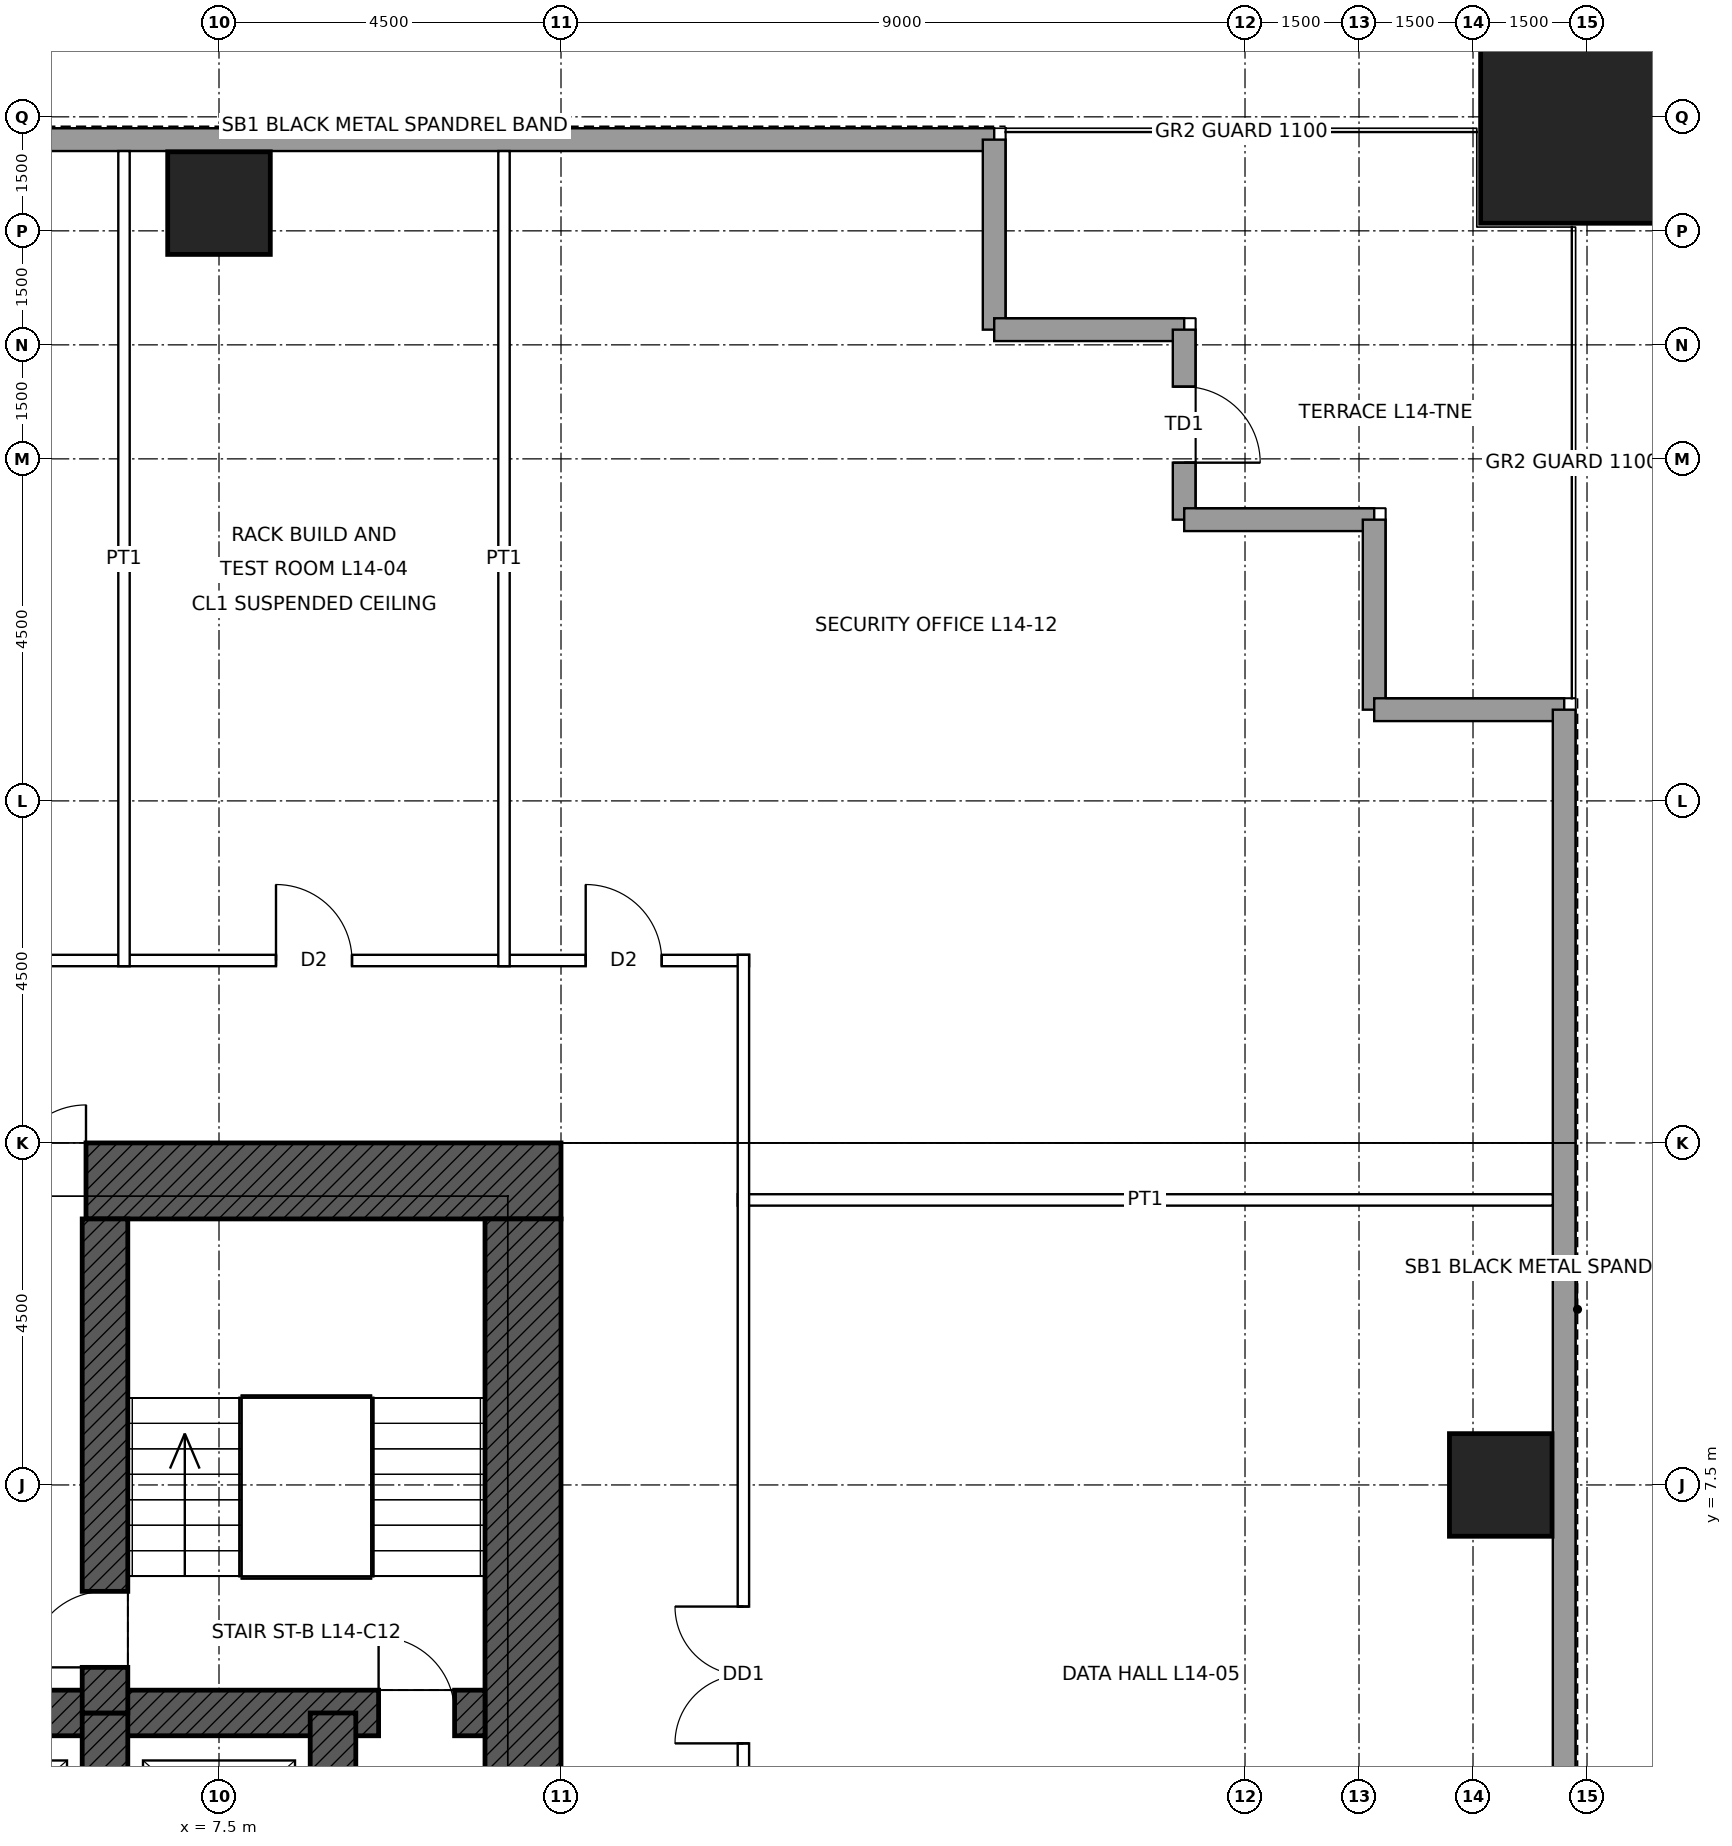
"""IFC4 building model, lengths in metres.
Left out: names, types, materials, properties, quantities, classifications, styles, units other than length and angle.
Written with IfcOpenShell. Run it as: python <this file> out.ifc"""

import sys

from ifc_helpers import new_model, si_unit, direction, frame, frame_2d, origin, origin_2d, place, context, subcontext, project, spatial, rectangle, hollow_rectangle, extrude, element, fill, save


model = new_model("IFC4")
c1 = context("Model", 3, precision=1e-05, world=origin(), true_north=direction((0.0, 1.0)))
c2 = subcontext(c1, "Body", "Model", "MODEL_VIEW")
j1 = project(units=[si_unit("LENGTHUNIT", "METRE"), si_unit("PLANEANGLEUNIT", "RADIAN")], contexts=[c1])
p1 = place(None, origin())
s1 = spatial("IfcSite", under=j1, at=p1, CompositionType="ELEMENT")
p2 = place(p1, origin())
s2 = spatial("IfcBuilding", under=s1, at=p2, CompositionType="ELEMENT")
p3 = place(p2, frame((0.0, 0.0, 73.4)))
s3 = spatial("IfcBuildingStorey", under=s2, at=p3, CompositionType="ELEMENT", Elevation=73.4)
p4 = place(p3, frame((25.5, 25.5, 0.0), z_axis=(0.0, 0.0, 1.0), x_axis=(1.0, 0.0, 0.0)))
e1 = element("IfcColumn", 1, at=p4, inside=s3, PredefinedType="COLUMN", context=c2, shape_type="SweptSolid", body=[
    extrude(hollow_rectangle(XDim=2.8, YDim=2.8, WallThickness=0.14, at=origin_2d()), origin(), (0.0, 0.0, 1.0), 5.0),
])
for number, where, z_axis, x_axis in (
    (2, (7.5, 24.365, 0.0), (0.0, 0.0, 1.0), (1.0, 0.0, 0.0)),
    (3, (24.365, 7.5, 0.0), (0.0, 0.0, 1.0), (1.0, 0.0, 0.0)),
):
    element("IfcColumn", number, at=place(p3, frame(where, z_axis=z_axis, x_axis=x_axis)), inside=s3, PredefinedType="COLUMN", context=c2, shape_type="SweptSolid", body=[
        extrude(hollow_rectangle(XDim=1.35, YDim=1.35, WallThickness=0.085, at=origin_2d()), origin(), (0.0, 0.0, 1.0), 5.0),
    ])
p5 = place(p3, frame((-12.0, 11.5, 0.0), z_axis=(0.0, 0.0, 1.0), x_axis=(1.0, 0.0, 0.0)))
e4 = element("IfcWall", 4, at=p5, inside=s3, PredefinedType="SHEAR", context=c2, shape_type="SweptSolid", body=[
    extrude(rectangle(XDim=24.0, YDim=1.0, at=frame_2d((12.0, 0.0))), origin(), (0.0, 0.0, 1.0), 5.0),
])
p6 = place(p5, frame((6.25, 0.0, 0.0)))
e5 = element("IfcOpeningElement", 5, at=p6, cuts=e4, PredefinedType="OPENING", context=c2, shape_type="SweptSolid", body=[
    extrude(rectangle(XDim=1.0, YDim=2.4, at=frame_2d((0.5, 1.2))), frame((0.0, 0.51, 0.0), z_axis=(0.0, -1.0, 0.0), x_axis=(1.0, 0.0, 0.0)), (0.0, 0.0, 1.0), 1.02),
])
p7 = place(p5, frame((16.75, 0.0, 0.0)))
e6 = element("IfcOpeningElement", 6, at=p7, cuts=e4, PredefinedType="OPENING", context=c2, shape_type="SweptSolid", body=[
    extrude(rectangle(XDim=1.0, YDim=2.4, at=frame_2d((0.5, 1.2))), frame((0.0, 0.51, 0.0), z_axis=(0.0, -1.0, 0.0), x_axis=(1.0, 0.0, 0.0)), (0.0, 0.0, 1.0), 1.02),
])
p8 = place(p3, frame((11.5, 11.0, 0.0), z_axis=(0.0, 0.0, 1.0), x_axis=(0.0, -1.0, 0.0)))
e7 = element("IfcWall", 7, at=p8, inside=s3, PredefinedType="SHEAR", context=c2, shape_type="SweptSolid", body=[
    extrude(rectangle(XDim=22.0, YDim=1.0, at=frame_2d((11.0, 0.0))), origin(), (0.0, 0.0, 1.0), 5.0),
])
p9 = place(p8, frame((10.5, 0.0, 0.0)))
e8 = element("IfcOpeningElement", 8, at=p9, cuts=e7, PredefinedType="OPENING", context=c2, shape_type="SweptSolid", body=[
    extrude(rectangle(XDim=1.0, YDim=2.4, at=frame_2d((0.5, 1.2))), frame((0.0, 0.51, 0.0), z_axis=(0.0, -1.0, 0.0), x_axis=(1.0, 0.0, 0.0)), (0.0, 0.0, 1.0), 1.02),
])
p10 = place(p3, frame((-11.0, 4.5, 0.0), z_axis=(0.0, 0.0, 1.0), x_axis=(1.0, 0.0, 0.0)))
e9 = element("IfcWall", 9, at=p10, inside=s3, PredefinedType="SHEAR", context=c2, shape_type="SweptSolid", body=[
    extrude(rectangle(XDim=22.0, YDim=0.6, at=frame_2d((11.0, 0.0))), origin(), (0.0, 0.0, 1.0), 5.0),
])
p11 = place(p10, frame((0.4, 0.0, 0.0)))
e10 = element("IfcOpeningElement", 10, at=p11, cuts=e9, PredefinedType="OPENING", context=c2, shape_type="SweptSolid", body=[
    extrude(rectangle(XDim=1.0, YDim=2.1, at=frame_2d((0.5, 1.05))), frame((0.0, 0.31, 0.0), z_axis=(0.0, -1.0, 0.0), x_axis=(1.0, 0.0, 0.0)), (0.0, 0.0, 1.0), 0.62),
])
p12 = place(p10, frame((20.6, 0.0, 0.0)))
e11 = element("IfcOpeningElement", 11, at=p12, cuts=e9, PredefinedType="OPENING", context=c2, shape_type="SweptSolid", body=[
    extrude(rectangle(XDim=1.0, YDim=2.1, at=frame_2d((0.5, 1.05))), frame((0.0, 0.31, 0.0), z_axis=(0.0, -1.0, 0.0), x_axis=(1.0, 0.0, 0.0)), (0.0, 0.0, 1.0), 0.62),
])
for number, where, z_axis, x_axis in (
    (12, (9.0, 1.5, 0.0), (0.0, 0.0, 1.0), (0.0, 1.0, 0.0)),
    (13, (6.0, 1.5, 0.0), (0.0, 0.0, 1.0), (0.0, 1.0, 0.0)),
):
    element("IfcWall", number, at=place(p3, frame(where, z_axis=z_axis, x_axis=x_axis)), inside=s3, PredefinedType="SHEAR", context=c2, shape_type="SweptSolid", body=[
        extrude(rectangle(XDim=3.0, YDim=0.6, at=frame_2d((1.5, 0.0))), origin(), (0.0, 0.0, 1.0), 5.0),
    ])
p13 = place(p3, frame((6.0, 4.5, 0.0), z_axis=(0.0, 0.0, 1.0), x_axis=(0.0, 1.0, 0.0)))
e14 = element("IfcWall", 14, at=p13, inside=s3, PredefinedType="SHEAR", context=c2, shape_type="SweptSolid", body=[
    extrude(rectangle(XDim=6.5, YDim=0.6, at=frame_2d((3.25, 0.0))), origin(), (0.0, 0.0, 1.0), 5.0),
])
p14 = place(p13, frame((0.6, 0.0, 0.0)))
e15 = element("IfcOpeningElement", 15, at=p14, cuts=e14, PredefinedType="OPENING", context=c2, shape_type="SweptSolid", body=[
    extrude(rectangle(XDim=1.0, YDim=2.1, at=frame_2d((0.5, 1.05))), frame((0.0, 0.31, 0.0), z_axis=(0.0, -1.0, 0.0), x_axis=(1.0, 0.0, 0.0)), (0.0, 0.0, 1.0), 0.62),
])
p15 = place(p3, frame((-17.7, 25.2, 0.0), z_axis=(0.0, 0.0, 1.0), x_axis=(1.0, 0.0, 0.0)))
e16 = element("IfcWall", 16, at=p15, inside=s3, PredefinedType="SOLIDWALL", context=c2, shape_type="SweptSolid", body=[
    extrude(rectangle(XDim=35.4, YDim=0.3, at=frame_2d((17.7, 0.0))), origin(), (0.0, 0.0, 1.0), 4.8),
])
for number, where, z_axis, x_axis in (
    (17, (17.7, 25.2, 0.0), (0.0, 0.0, 1.0), (0.0, -1.0, 0.0)),
    (18, (17.7, 22.7, 0.0), (0.0, 0.0, 1.0), (1.0, 0.0, 0.0)),
):
    element("IfcWall", number, at=place(p3, frame(where, z_axis=z_axis, x_axis=x_axis)), inside=s3, PredefinedType="SOLIDWALL", context=c2, shape_type="SweptSolid", body=[
        extrude(rectangle(XDim=2.5, YDim=0.3, at=frame_2d((1.25, 0.0))), origin(), (0.0, 0.0, 1.0), 4.8),
    ])
p16 = place(p3, frame((20.2, 22.7, 0.0), z_axis=(0.0, 0.0, 1.0), x_axis=(0.0, -1.0, 0.0)))
e19 = element("IfcWall", 19, at=p16, inside=s3, PredefinedType="SOLIDWALL", context=c2, shape_type="SweptSolid", body=[
    extrude(rectangle(XDim=2.5, YDim=0.3, at=frame_2d((1.25, 0.0))), origin(), (0.0, 0.0, 1.0), 4.8),
])
p17 = place(p16, frame((0.75, 0.0, 0.0)))
e20 = element("IfcOpeningElement", 20, at=p17, cuts=e19, PredefinedType="OPENING", context=c2, shape_type="SweptSolid", body=[
    extrude(rectangle(XDim=1.0, YDim=2.4, at=frame_2d((0.5, 1.2))), frame((0.0, 0.16, 0.0), z_axis=(0.0, -1.0, 0.0), x_axis=(1.0, 0.0, 0.0)), (0.0, 0.0, 1.0), 0.32),
])
for number, where, z_axis, x_axis in (
    (21, (20.2, 20.2, 0.0), (0.0, 0.0, 1.0), (1.0, 0.0, 0.0)),
    (22, (22.7, 20.2, 0.0), (0.0, 0.0, 1.0), (0.0, -1.0, 0.0)),
    (23, (22.7, 17.7, 0.0), (0.0, 0.0, 1.0), (1.0, 0.0, 0.0)),
):
    element("IfcWall", number, at=place(p3, frame(where, z_axis=z_axis, x_axis=x_axis)), inside=s3, PredefinedType="SOLIDWALL", context=c2, shape_type="SweptSolid", body=[
        extrude(rectangle(XDim=2.5, YDim=0.3, at=frame_2d((1.25, 0.0))), origin(), (0.0, 0.0, 1.0), 4.8),
    ])
p18 = place(p3, frame((25.2, 17.7, 0.0), z_axis=(0.0, 0.0, 1.0), x_axis=(0.0, -1.0, 0.0)))
e24 = element("IfcWall", 24, at=p18, inside=s3, PredefinedType="SOLIDWALL", context=c2, shape_type="SweptSolid", body=[
    extrude(rectangle(XDim=35.4, YDim=0.3, at=frame_2d((17.7, 0.0))), origin(), (0.0, 0.0, 1.0), 4.8),
])
p19 = place(p3, frame((14.325, 11.25, 0.0), z_axis=(0.0, 0.0, 1.0), x_axis=(1.0, 0.0, 0.0)))
e25 = element("IfcWall", 25, at=p19, inside=s3, PredefinedType="PARTITIONING", context=c2, shape_type="SweptSolid", body=[
    extrude(rectangle(XDim=10.725, YDim=0.15, at=frame_2d((5.363, 0.0))), origin(), (0.0, 0.0, 1.0), 3.853),
])
p20 = place(p3, frame((-14.475, 14.4, 0.0), z_axis=(0.0, 0.0, 1.0), x_axis=(1.0, 0.0, 0.0)))
e26 = element("IfcWall", 26, at=p20, inside=s3, PredefinedType="PARTITIONING", context=c2, shape_type="SweptSolid", body=[
    extrude(rectangle(XDim=28.95, YDim=0.15, at=frame_2d((14.475, 0.0))), origin(), (0.0, 0.0, 1.0), 4.8),
])
p21 = place(p20, frame((4.825, 0.0, 0.0)))
e27 = element("IfcOpeningElement", 27, at=p21, cuts=e26, PredefinedType="OPENING", context=c2, shape_type="SweptSolid", body=[
    extrude(rectangle(XDim=1.8, YDim=2.4, at=frame_2d((0.9, 1.2))), frame((0.0, 0.085, 0.0), z_axis=(0.0, -1.0, 0.0), x_axis=(1.0, 0.0, 0.0)), (0.0, 0.0, 1.0), 0.17),
])
p22 = place(p20, frame((13.575, 0.0, 0.0)))
e28 = element("IfcOpeningElement", 28, at=p22, cuts=e26, PredefinedType="OPENING", context=c2, shape_type="SweptSolid", body=[
    extrude(rectangle(XDim=1.8, YDim=2.4, at=frame_2d((0.9, 1.2))), frame((0.0, 0.085, 0.0), z_axis=(0.0, -1.0, 0.0), x_axis=(1.0, 0.0, 0.0)), (0.0, 0.0, 1.0), 0.17),
])
p23 = place(p20, frame((22.725, 0.0, 0.0)))
e29 = element("IfcOpeningElement", 29, at=p23, cuts=e26, PredefinedType="OPENING", context=c2, shape_type="SweptSolid", body=[
    extrude(rectangle(XDim=1.0, YDim=2.1, at=frame_2d((0.5, 1.05))), frame((0.0, 0.085, 0.0), z_axis=(0.0, -1.0, 0.0), x_axis=(1.0, 0.0, 0.0)), (0.0, 0.0, 1.0), 0.17),
])
p24 = place(p20, frame((26.8, 0.0, 0.0)))
e30 = element("IfcOpeningElement", 30, at=p24, cuts=e26, PredefinedType="OPENING", context=c2, shape_type="SweptSolid", body=[
    extrude(rectangle(XDim=1.0, YDim=2.1, at=frame_2d((0.5, 1.05))), frame((0.0, 0.085, 0.0), z_axis=(0.0, -1.0, 0.0), x_axis=(1.0, 0.0, 0.0)), (0.0, 0.0, 1.0), 0.17),
])
p25 = place(p20, frame((1.15, 0.0, 0.0)))
e31 = element("IfcOpeningElement", 31, at=p25, cuts=e26, PredefinedType="OPENING", context=c2, shape_type="SweptSolid", body=[
    extrude(rectangle(XDim=1.0, YDim=2.1, at=frame_2d((0.5, 1.05))), frame((0.0, 0.085, 0.0), z_axis=(0.0, -1.0, 0.0), x_axis=(1.0, 0.0, 0.0)), (0.0, 0.0, 1.0), 0.17),
])
p26 = place(p3, frame((6.25, 14.325, 0.0), z_axis=(0.0, 0.0, 1.0), x_axis=(0.0, 1.0, 0.0)))
e32 = element("IfcWall", 32, at=p26, inside=s3, PredefinedType="PARTITIONING", context=c2, shape_type="SweptSolid", body=[
    extrude(rectangle(XDim=10.725, YDim=0.15, at=frame_2d((5.363, 0.0))), origin(), (0.0, 0.0, 1.0), 4.8),
])
p27 = place(p3, frame((11.25, 14.325, 0.0), z_axis=(0.0, 0.0, 1.0), x_axis=(0.0, 1.0, 0.0)))
e33 = element("IfcWall", 33, at=p27, inside=s3, PredefinedType="PARTITIONING", context=c2, shape_type="SweptSolid", body=[
    extrude(rectangle(XDim=10.725, YDim=0.15, at=frame_2d((5.363, 0.0))), origin(), (0.0, 0.0, 1.0), 3.853),
])
p28 = place(p3, frame((14.4, -14.475, 0.0), z_axis=(0.0, 0.0, 1.0), x_axis=(0.0, 1.0, 0.0)))
e34 = element("IfcWall", 34, at=p28, inside=s3, PredefinedType="PARTITIONING", context=c2, shape_type="SweptSolid", body=[
    extrude(rectangle(XDim=28.95, YDim=0.15, at=frame_2d((14.475, 0.0))), origin(), (0.0, 0.0, 1.0), 4.8),
])
p29 = place(p28, frame((18.575, 0.0, 0.0)))
e35 = element("IfcOpeningElement", 35, at=p29, cuts=e34, PredefinedType="OPENING", context=c2, shape_type="SweptSolid", body=[
    extrude(rectangle(XDim=1.8, YDim=2.4, at=frame_2d((0.9, 1.2))), frame((0.0, 0.085, 0.0), z_axis=(0.0, -1.0, 0.0), x_axis=(1.0, 0.0, 0.0)), (0.0, 0.0, 1.0), 0.17),
])
p30 = place(p28, frame((7.325, 0.0, 0.0)))
e36 = element("IfcOpeningElement", 36, at=p30, cuts=e34, PredefinedType="OPENING", context=c2, shape_type="SweptSolid", body=[
    extrude(rectangle(XDim=1.8, YDim=2.4, at=frame_2d((0.9, 1.2))), frame((0.0, 0.085, 0.0), z_axis=(0.0, -1.0, 0.0), x_axis=(1.0, 0.0, 0.0)), (0.0, 0.0, 1.0), 0.17),
])
p31 = place(p17, origin())
e37 = element("IfcDoor", 37, at=p31, inside=s3, OperationType="SINGLE_SWING_RIGHT", PredefinedType="DOOR", context=c2, shape_type="SweptSolid", body=[
    extrude(rectangle(XDim=1.0, YDim=2.4, at=frame_2d((0.5, 1.2))), frame((0.0, 0.025, 0.0), z_axis=(0.0, -1.0, 0.0), x_axis=(1.0, 0.0, 0.0)), (0.0, 0.0, 1.0), 0.05),
])
fill(e20, e37)
p32 = place(p12, origin())
e38 = element("IfcDoor", 38, at=p32, inside=s3, OperationType="SINGLE_SWING_LEFT", PredefinedType="DOOR", context=c2, shape_type="SweptSolid", body=[
    extrude(rectangle(XDim=1.0, YDim=2.1, at=frame_2d((0.5, 1.05))), frame((0.0, 0.025, 0.0), z_axis=(0.0, -1.0, 0.0), x_axis=(1.0, 0.0, 0.0)), (0.0, 0.0, 1.0), 0.05),
])
fill(e11, e38)
p33 = place(p14, origin())
e39 = element("IfcDoor", 39, at=p33, inside=s3, OperationType="SINGLE_SWING_LEFT", PredefinedType="DOOR", context=c2, shape_type="SweptSolid", body=[
    extrude(rectangle(XDim=1.0, YDim=2.1, at=frame_2d((0.5, 1.05))), frame((0.0, 0.025, 0.0), z_axis=(0.0, -1.0, 0.0), x_axis=(1.0, 0.0, 0.0)), (0.0, 0.0, 1.0), 0.05),
])
fill(e15, e39)
p34 = place(p7, origin())
e40 = element("IfcDoor", 40, at=p34, inside=s3, OperationType="SINGLE_SWING_RIGHT", PredefinedType="DOOR", context=c2, shape_type="SweptSolid", body=[
    extrude(rectangle(XDim=1.0, YDim=2.4, at=frame_2d((0.5, 1.2))), frame((0.0, 0.485, 0.0), z_axis=(0.0, -1.0, 0.0), x_axis=(1.0, 0.0, 0.0)), (0.0, 0.0, 1.0), 0.05),
])
fill(e6, e40)
p35 = place(p23, origin())
e41 = element("IfcDoor", 41, at=p35, inside=s3, OperationType="SINGLE_SWING_LEFT", PredefinedType="DOOR", context=c2, shape_type="SweptSolid", body=[
    extrude(rectangle(XDim=1.0, YDim=2.1, at=frame_2d((0.5, 1.05))), frame((0.0, 0.025, 0.0), z_axis=(0.0, -1.0, 0.0), x_axis=(1.0, 0.0, 0.0)), (0.0, 0.0, 1.0), 0.05),
])
fill(e29, e41)
p36 = place(p29, origin())
e42 = element("IfcDoor", 42, at=p36, inside=s3, OperationType="DOUBLE_DOOR_SINGLE_SWING", PredefinedType="DOOR", context=c2, shape_type="SweptSolid", body=[
    extrude(rectangle(XDim=1.8, YDim=2.4, at=frame_2d((0.9, 1.2))), frame((0.0, 0.025, 0.0), z_axis=(0.0, -1.0, 0.0), x_axis=(1.0, 0.0, 0.0)), (0.0, 0.0, 1.0), 0.05),
])
fill(e35, e42)
p37 = place(p24, origin())
e43 = element("IfcDoor", 43, at=p37, inside=s3, OperationType="SINGLE_SWING_LEFT", PredefinedType="DOOR", context=c2, shape_type="SweptSolid", body=[
    extrude(rectangle(XDim=1.0, YDim=2.1, at=frame_2d((0.5, 1.05))), frame((0.0, 0.025, 0.0), z_axis=(0.0, -1.0, 0.0), x_axis=(1.0, 0.0, 0.0)), (0.0, 0.0, 1.0), 0.05),
])
fill(e30, e43)
save(model, sys.argv[1])
